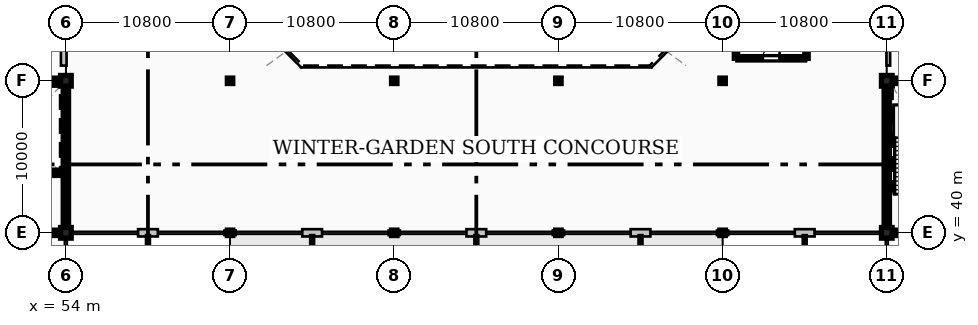
"""IFC4 building model, lengths in metres.
Left out: names, types, materials, properties, quantities, classifications, styles, units other than length and angle.
Written with IfcOpenShell. Run it as: python <this file> out.ifc"""

import sys

from ifc_helpers import new_model, si_unit, direction, frame, frame_2d, origin, origin_2d, place, context, subcontext, project, spatial, rectangle, hollow_circle, extrude, element, fill, save


model = new_model("IFC4")
c1 = context("Model", 3, precision=1e-05, world=origin(), true_north=direction((0.0, 1.0)))
c2 = subcontext(c1, "Body", "Model", "MODEL_VIEW")
j1 = project(units=[si_unit("LENGTHUNIT", "METRE"), si_unit("PLANEANGLEUNIT", "RADIAN")], contexts=[c1])
p1 = place(None, origin())
s1 = spatial("IfcSite", under=j1, at=p1, CompositionType="ELEMENT")
p2 = place(p1, origin())
s2 = spatial("IfcBuilding", under=s1, at=p2, CompositionType="ELEMENT")
p3 = place(p2, frame((0.0, 0.0, 4.8)))
s3 = spatial("IfcBuildingStorey", under=s2, at=p3, CompositionType="ELEMENT", Elevation=4.8)
for number, where, z_axis, x_axis in (
    (1, (54.0, 40.0, 0.0), (0.0, 0.0, 1.0), (1.0, 0.0, 0.0)),
    (2, (54.0, 50.0, 0.0), (0.0, 0.0, 1.0), (1.0, 0.0, 0.0)),
):
    element("IfcColumn", number, at=place(p3, frame(where, z_axis=z_axis, x_axis=x_axis)), inside=s3, PredefinedType="COLUMN", context=c2, shape_type="SweptSolid", body=[
        extrude(rectangle(XDim=0.7, YDim=0.7, at=origin_2d()), origin(), (0.0, 0.0, 1.0), 4.8),
    ])
for number, where, z_axis, x_axis in (
    (3, (64.8, 40.0, 0.0), (0.0, 0.0, 1.0), (1.0, 0.0, 0.0)),
    (4, (64.8, 50.0, 0.0), (0.0, 0.0, 1.0), (1.0, 0.0, 0.0)),
    (5, (75.6, 40.0, 0.0), (0.0, 0.0, 1.0), (1.0, 0.0, 0.0)),
    (6, (75.6, 50.0, 0.0), (0.0, 0.0, 1.0), (1.0, 0.0, 0.0)),
    (7, (86.4, 40.0, 0.0), (0.0, 0.0, 1.0), (1.0, 0.0, 0.0)),
    (8, (86.4, 50.0, 0.0), (0.0, 0.0, 1.0), (1.0, 0.0, 0.0)),
    (9, (97.2, 40.0, 0.0), (0.0, 0.0, 1.0), (1.0, 0.0, 0.0)),
    (10, (97.2, 50.0, 0.0), (0.0, 0.0, 1.0), (1.0, 0.0, 0.0)),
):
    element("IfcColumn", number, at=place(p3, frame(where, z_axis=z_axis, x_axis=x_axis)), inside=s3, PredefinedType="COLUMN", context=c2, shape_type="SweptSolid", body=[
        extrude(hollow_circle(Radius=0.178, WallThickness=0.016, at=origin_2d()), origin(), (0.0, 0.0, 1.0), 4.8),
    ])
for number, where, z_axis, x_axis in (
    (11, (108.0, 40.0, 0.0), (0.0, 0.0, 1.0), (1.0, 0.0, 0.0)),
    (12, (108.0, 50.0, 0.0), (0.0, 0.0, 1.0), (1.0, 0.0, 0.0)),
):
    element("IfcColumn", number, at=place(p3, frame(where, z_axis=z_axis, x_axis=x_axis)), inside=s3, PredefinedType="COLUMN", context=c2, shape_type="SweptSolid", body=[
        extrude(rectangle(XDim=0.7, YDim=0.7, at=origin_2d()), origin(), (0.0, 0.0, 1.0), 4.8),
    ])
p4 = place(p3, frame((54.0, 39.63, 0.0), z_axis=(0.0, 0.0, 1.0), x_axis=(0.0, 1.0, 0.0)))
e13 = element("IfcWall", 13, at=p4, inside=s3, PredefinedType="STANDARD", context=c2, shape_type="SweptSolid", body=[
    extrude(rectangle(XDim=0.225, YDim=0.3, at=frame_2d((0.113, 0.0))), origin(), (0.0, 0.0, 1.0), 4.56),
])
p5 = place(p3, frame((58.75, 40.0, 0.0), z_axis=(0.0, 0.0, 1.0), x_axis=(1.0, 0.0, 0.0)))
e14 = element("IfcWall", 14, at=p5, inside=s3, PredefinedType="STANDARD", context=c2, shape_type="SweptSolid", body=[
    extrude(rectangle(XDim=1.3, YDim=0.48, at=frame_2d((0.65, 0.0))), origin(), (0.0, 0.0, 1.0), 4.06),
])
for number, where, z_axis, x_axis in (
    (15, (54.145, 40.0, 0.0), (0.0, 0.0, 1.0), (1.0, 0.0, 0.0)),
    (16, (64.43, 40.0, 0.0), (0.0, 0.0, 1.0), (1.0, 0.0, 0.0)),
):
    element("IfcWall", number, at=place(p3, frame(where, z_axis=z_axis, x_axis=x_axis)), inside=s3, PredefinedType="STANDARD", context=c2, shape_type="SweptSolid", body=[
        extrude(rectangle(XDim=0.225, YDim=0.3, at=frame_2d((0.113, 0.0))), origin(), (0.0, 0.0, 1.0), 4.56),
    ])
p6 = place(p3, frame((69.55, 40.0, 0.0), z_axis=(0.0, 0.0, 1.0), x_axis=(1.0, 0.0, 0.0)))
e17 = element("IfcWall", 17, at=p6, inside=s3, PredefinedType="STANDARD", context=c2, shape_type="SweptSolid", body=[
    extrude(rectangle(XDim=1.3, YDim=0.48, at=frame_2d((0.65, 0.0))), origin(), (0.0, 0.0, 1.0), 4.06),
])
p7 = place(p3, frame((64.945, 40.0, 0.0), z_axis=(0.0, 0.0, 1.0), x_axis=(1.0, 0.0, 0.0)))
e18 = element("IfcWall", 18, at=p7, inside=s3, PredefinedType="STANDARD", context=c2, shape_type="SweptSolid", body=[
    extrude(rectangle(XDim=0.225, YDim=0.3, at=frame_2d((0.112, 0.0))), origin(), (0.0, 0.0, 1.0), 4.56),
])
p8 = place(p3, frame((75.23, 40.0, 0.0), z_axis=(0.0, 0.0, 1.0), x_axis=(1.0, 0.0, 0.0)))
e19 = element("IfcWall", 19, at=p8, inside=s3, PredefinedType="STANDARD", context=c2, shape_type="SweptSolid", body=[
    extrude(rectangle(XDim=0.225, YDim=0.3, at=frame_2d((0.113, 0.0))), origin(), (0.0, 0.0, 1.0), 4.56),
])
p9 = place(p3, frame((80.35, 40.0, 0.0), z_axis=(0.0, 0.0, 1.0), x_axis=(1.0, 0.0, 0.0)))
e20 = element("IfcWall", 20, at=p9, inside=s3, PredefinedType="STANDARD", context=c2, shape_type="SweptSolid", body=[
    extrude(rectangle(XDim=1.3, YDim=0.48, at=frame_2d((0.65, 0.0))), origin(), (0.0, 0.0, 1.0), 4.06),
])
for number, where, z_axis, x_axis in (
    (21, (75.745, 40.0, 0.0), (0.0, 0.0, 1.0), (1.0, 0.0, 0.0)),
    (22, (86.03, 40.0, 0.0), (0.0, 0.0, 1.0), (1.0, 0.0, 0.0)),
):
    element("IfcWall", number, at=place(p3, frame(where, z_axis=z_axis, x_axis=x_axis)), inside=s3, PredefinedType="STANDARD", context=c2, shape_type="SweptSolid", body=[
        extrude(rectangle(XDim=0.225, YDim=0.3, at=frame_2d((0.112, 0.0))), origin(), (0.0, 0.0, 1.0), 4.56),
    ])
p10 = place(p3, frame((91.15, 40.0, 0.0), z_axis=(0.0, 0.0, 1.0), x_axis=(1.0, 0.0, 0.0)))
e23 = element("IfcWall", 23, at=p10, inside=s3, PredefinedType="STANDARD", context=c2, shape_type="SweptSolid", body=[
    extrude(rectangle(XDim=1.3, YDim=0.48, at=frame_2d((0.65, 0.0))), origin(), (0.0, 0.0, 1.0), 4.06),
])
p11 = place(p3, frame((86.545, 40.0, 0.0), z_axis=(0.0, 0.0, 1.0), x_axis=(1.0, 0.0, 0.0)))
e24 = element("IfcWall", 24, at=p11, inside=s3, PredefinedType="STANDARD", context=c2, shape_type="SweptSolid", body=[
    extrude(rectangle(XDim=0.225, YDim=0.3, at=frame_2d((0.113, 0.0))), origin(), (0.0, 0.0, 1.0), 4.56),
])
p12 = place(p3, frame((96.83, 40.0, 0.0), z_axis=(0.0, 0.0, 1.0), x_axis=(1.0, 0.0, 0.0)))
e25 = element("IfcWall", 25, at=p12, inside=s3, PredefinedType="STANDARD", context=c2, shape_type="SweptSolid", body=[
    extrude(rectangle(XDim=0.225, YDim=0.3, at=frame_2d((0.112, 0.0))), origin(), (0.0, 0.0, 1.0), 4.56),
])
p13 = place(p3, frame((101.95, 40.0, 0.0), z_axis=(0.0, 0.0, 1.0), x_axis=(1.0, 0.0, 0.0)))
e26 = element("IfcWall", 26, at=p13, inside=s3, PredefinedType="STANDARD", context=c2, shape_type="SweptSolid", body=[
    extrude(rectangle(XDim=1.3, YDim=0.48, at=frame_2d((0.65, 0.0))), origin(), (0.0, 0.0, 1.0), 4.06),
])
for number, where, z_axis, x_axis in (
    (27, (97.345, 40.0, 0.0), (0.0, 0.0, 1.0), (1.0, 0.0, 0.0)),
    (28, (107.63, 40.0, 0.0), (0.0, 0.0, 1.0), (1.0, 0.0, 0.0)),
    (29, (108.0, 39.855, 0.0), (0.0, 0.0, 1.0), (0.0, -1.0, 0.0)),
):
    element("IfcWall", number, at=place(p3, frame(where, z_axis=z_axis, x_axis=x_axis)), inside=s3, PredefinedType="STANDARD", context=c2, shape_type="SweptSolid", body=[
        extrude(rectangle(XDim=0.225, YDim=0.3, at=frame_2d((0.113, 0.0))), origin(), (0.0, 0.0, 1.0), 4.56),
    ])
for number, where, z_axis, x_axis in (
    (30, (108.35, 40.0, 0.0), (0.0, 0.0, 1.0), (1.0, 0.0, 0.0)),
    (31, (108.35, 50.0, 0.0), (0.0, 0.0, 1.0), (1.0, 0.0, 0.0)),
):
    element("IfcWall", number, at=place(p3, frame(where, z_axis=z_axis, x_axis=x_axis)), inside=s3, PredefinedType="SHEAR", context=c2, shape_type="SweptSolid", body=[
        extrude(rectangle(XDim=10.1, YDim=0.35, at=frame_2d((5.05, 0.0))), origin(), (0.0, 0.0, 1.0), 4.56),
    ])
p14 = place(p3, frame((108.0, 40.35, 0.0), z_axis=(0.0, 0.0, 1.0), x_axis=(0.0, 1.0, 0.0)))
e32 = element("IfcWall", 32, at=p14, inside=s3, PredefinedType="SHEAR", context=c2, shape_type="SweptSolid", body=[
    extrude(rectangle(XDim=9.3, YDim=0.35, at=frame_2d((4.65, 0.0))), origin(), (0.0, 0.0, 1.0), 4.56),
])
p15 = place(p3, frame((43.55, 40.0, 0.0), z_axis=(0.0, 0.0, 1.0), x_axis=(1.0, 0.0, 0.0)))
e33 = element("IfcWall", 33, at=p15, inside=s3, PredefinedType="SHEAR", context=c2, shape_type="SweptSolid", body=[
    extrude(rectangle(XDim=10.1, YDim=0.35, at=frame_2d((5.05, 0.0))), origin(), (0.0, 0.0, 1.0), 4.56),
])
p16 = place(p15, frame((6.21, 0.0, 0.0)))
e34 = element("IfcOpeningElement", 34, at=p16, cuts=e33, PredefinedType="OPENING", context=c2, shape_type="SweptSolid", body=[
    extrude(rectangle(XDim=1.8, YDim=2.25, at=frame_2d((0.9, 1.125))), frame((0.0, 0.185, 0.0), z_axis=(0.0, -1.0, 0.0), x_axis=(1.0, 0.0, 0.0)), (0.0, 0.0, 1.0), 0.37),
])
p17 = place(p3, frame((43.55, 50.0, 0.0), z_axis=(0.0, 0.0, 1.0), x_axis=(1.0, 0.0, 0.0)))
e35 = element("IfcWall", 35, at=p17, inside=s3, PredefinedType="SHEAR", context=c2, shape_type="SweptSolid", body=[
    extrude(rectangle(XDim=10.1, YDim=0.35, at=frame_2d((5.05, 0.0))), origin(), (0.0, 0.0, 1.0), 4.56),
])
p18 = place(p3, frame((54.0, 40.35, 0.0), z_axis=(0.0, 0.0, 1.0), x_axis=(0.0, 1.0, 0.0)))
e36 = element("IfcWall", 36, at=p18, inside=s3, PredefinedType="SHEAR", context=c2, shape_type="SweptSolid", body=[
    extrude(rectangle(XDim=9.3, YDim=0.35, at=frame_2d((4.65, 0.0))), origin(), (0.0, 0.0, 1.0), 4.56),
])
p19 = place(p3, frame((48.33, 43.95, 0.0), z_axis=(0.0, 0.0, 1.0), x_axis=(1.0, 0.0, 0.0)))
e37 = element("IfcWall", 37, at=p19, inside=s3, PredefinedType="SHEAR", context=c2, shape_type="SweptSolid", body=[
    extrude(rectangle(XDim=5.49, YDim=0.35, at=frame_2d((2.745, 0.0))), origin(), (0.0, 0.0, 1.0), 4.56),
])
p20 = place(p19, frame((2.1, 0.0, 0.0)))
e38 = element("IfcOpeningElement", 38, at=p20, cuts=e37, PredefinedType="OPENING", context=c2, shape_type="SweptSolid", body=[
    extrude(rectangle(XDim=1.1, YDim=2.2, at=frame_2d((0.55, 1.1))), frame((0.0, 0.185, 0.0), z_axis=(0.0, -1.0, 0.0), x_axis=(1.0, 0.0, 0.0)), (0.0, 0.0, 1.0), 0.37),
])
for number, where, z_axis, x_axis in (
    (39, (98.08, 51.48, 0.0), (0.0, 0.0, 1.0), (0.0, 1.0, 0.0)),
    (40, (102.72, 51.48, 0.0), (0.0, 0.0, 1.0), (0.0, 1.0, 0.0)),
):
    element("IfcWall", number, at=place(p3, frame(where, z_axis=z_axis, x_axis=x_axis)), inside=s3, PredefinedType="SHEAR", context=c2, shape_type="SweptSolid", body=[
        extrude(rectangle(XDim=9.79, YDim=0.22, at=frame_2d((4.895, 0.0))), origin(), (0.0, 0.0, 1.0), 4.56),
    ])
p21 = place(p3, frame((98.2, 51.48, 0.0), z_axis=(0.0, 0.0, 1.0), x_axis=(1.0, 0.0, 0.0)))
e41 = element("IfcWall", 41, at=p21, inside=s3, PredefinedType="SHEAR", context=c2, shape_type="SweptSolid", body=[
    extrude(rectangle(XDim=4.4, YDim=0.22, at=frame_2d((2.2, 0.0))), origin(), (0.0, 0.0, 1.0), 4.56),
])
p22 = place(p21, frame((1.65, 0.0, 0.0)))
e42 = element("IfcOpeningElement", 42, at=p22, cuts=e41, PredefinedType="OPENING", context=c2, shape_type="SweptSolid", body=[
    extrude(rectangle(XDim=1.1, YDim=2.2, at=frame_2d((0.55, 1.1))), frame((0.0, 0.12, 0.0), z_axis=(0.0, -1.0, 0.0), x_axis=(1.0, 0.0, 0.0)), (0.0, 0.0, 1.0), 0.24),
])
p23 = place(p3, frame((53.86, 51.0, 0.0), z_axis=(0.0, 0.0, 1.0), x_axis=(0.0, 1.0, 0.0)))
e43 = element("IfcWall", 43, at=p23, inside=s3, PredefinedType="PARTITIONING", context=c2, shape_type="SweptSolid", body=[
    extrude(rectangle(XDim=10.8, YDim=0.37, at=frame_2d((5.4, 0.0))), origin(), (0.0, 0.0, 1.0), 4.52),
])
p24 = place(p3, frame((108.1, 51.0, 0.0), z_axis=(0.0, 0.0, 1.0), x_axis=(0.0, 1.0, 0.0)))
e44 = element("IfcWall", 44, at=p24, inside=s3, PredefinedType="SOLIDWALL", context=c2, shape_type="SweptSolid", body=[
    extrude(rectangle(XDim=10.82, YDim=0.24, at=frame_2d((5.41, 0.0))), origin(), (0.0, 0.0, 1.0), 3.919),
])
p25 = place(p22, origin())
e45 = element("IfcDoor", 45, at=p25, inside=s3, OperationType="SINGLE_SWING_RIGHT", PredefinedType="DOOR", context=c2, shape_type="SweptSolid", body=[
    extrude(rectangle(XDim=1.1, YDim=2.2, at=frame_2d((0.55, 1.1))), frame((0.0, 0.025, 0.0), z_axis=(0.0, -1.0, 0.0), x_axis=(1.0, 0.0, 0.0)), (0.0, 0.0, 1.0), 0.05),
])
fill(e42, e45)
save(model, sys.argv[1])
